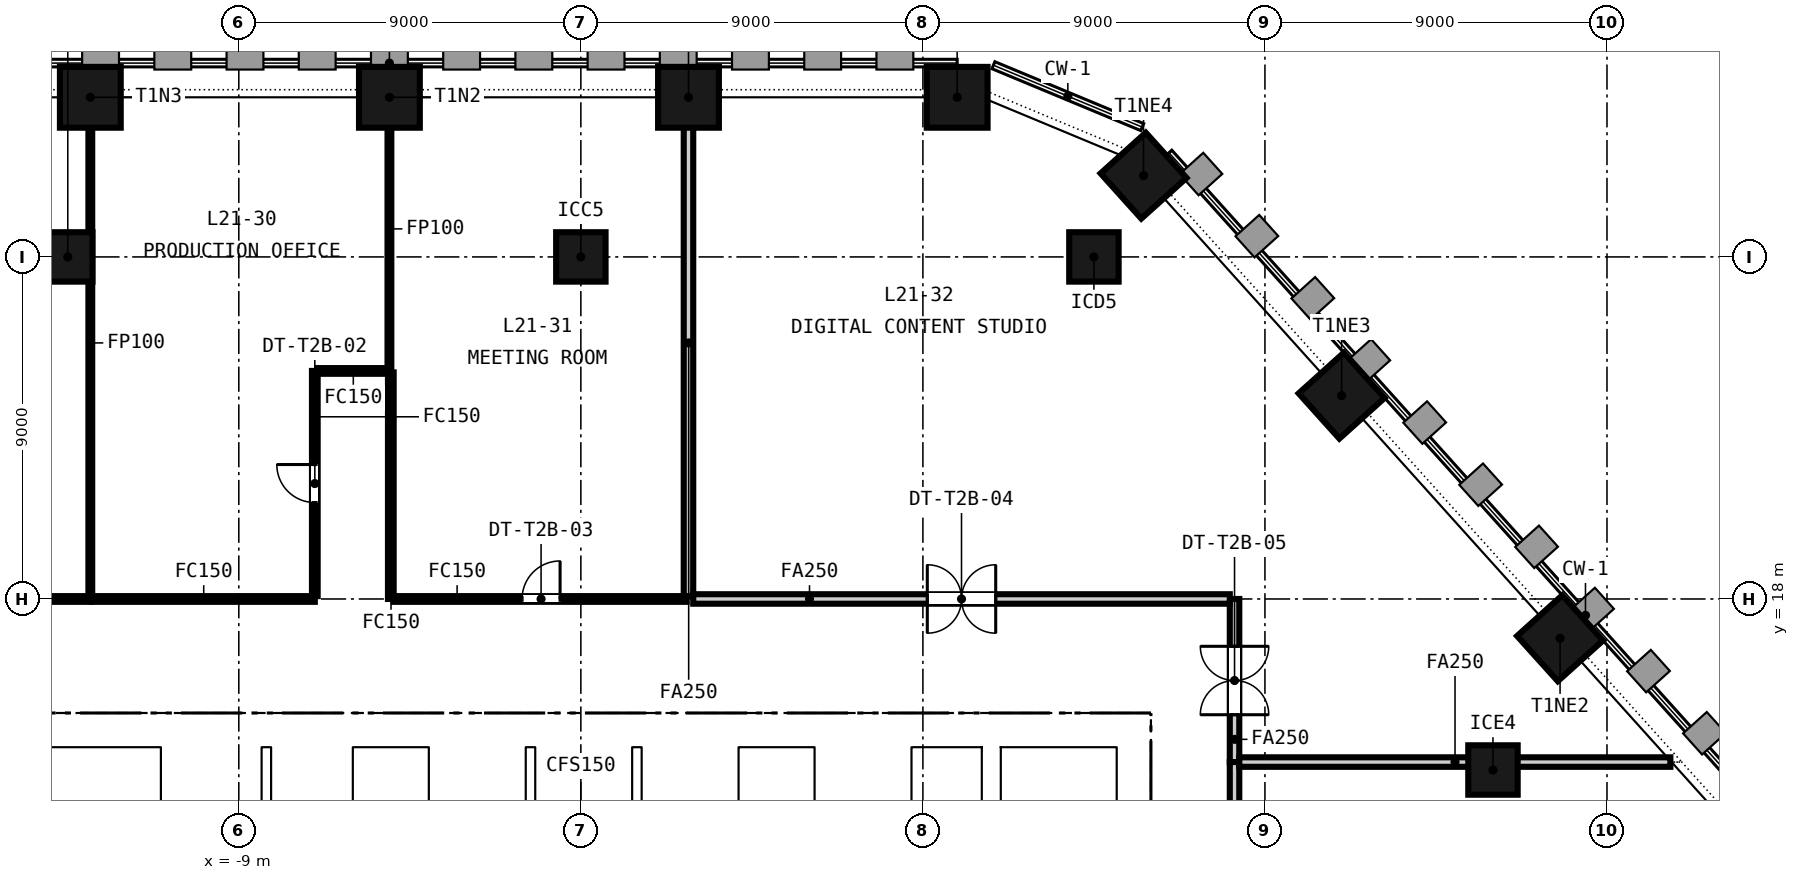
"""IFC4 building model, lengths in metres.
Left out: names, types, materials, properties, quantities, classifications, styles, units other than length and angle.
Written with IfcOpenShell. Run it as: python <this file> out.ifc"""

import sys

from ifc_helpers import new_model, si_unit, direction, frame, frame_2d, origin, origin_2d, place, context, subcontext, project, spatial, rectangle, extrude, element, fill, save


model = new_model("IFC4")
c1 = context("Model", 3, precision=1e-05, world=origin(), true_north=direction((0.0, 1.0)))
c2 = subcontext(c1, "Body", "Model", "MODEL_VIEW")
j1 = project(units=[si_unit("LENGTHUNIT", "METRE"), si_unit("PLANEANGLEUNIT", "RADIAN")], contexts=[c1])
p1 = place(None, origin())
s1 = spatial("IfcSite", under=j1, at=p1, CompositionType="ELEMENT")
p2 = place(p1, origin())
s2 = spatial("IfcBuilding", under=s1, at=p2, CompositionType="ELEMENT")
p3 = place(p2, frame((0.0, 0.0, 91.6)))
s3 = spatial("IfcBuildingStorey", under=s2, at=p3, CompositionType="ELEMENT", Elevation=91.6)
p4 = place(p3, frame((-15.0, 14.55, -0.15), z_axis=(0.0, 0.0, 1.0), x_axis=(1.0, 0.0, 0.0)))
e1 = element("IfcWall", 1, at=p4, inside=s3, PredefinedType="SOLIDWALL", context=c2, shape_type="SweptSolid", body=[
    extrude(rectangle(XDim=30.0, YDim=0.9, at=frame_2d((15.0, 0.0))), origin(), (0.0, 0.0, 1.0), 3.65),
])
p5 = place(p4, frame((9.25, 0.0, 0.15)))
e2 = element("IfcOpeningElement", 2, at=p5, cuts=e1, PredefinedType="OPENING", context=c2, shape_type="SweptSolid", body=[
    extrude(rectangle(XDim=1.5, YDim=2.1, at=frame_2d((0.75, 1.05))), frame((0.0, 0.46, 0.0), z_axis=(0.0, -1.0, 0.0), x_axis=(1.0, 0.0, 0.0)), (0.0, 0.0, 1.0), 0.92),
])
p6 = place(p4, frame((19.4, 0.0, 0.15)))
e3 = element("IfcOpeningElement", 3, at=p6, cuts=e1, PredefinedType="OPENING", context=c2, shape_type="SweptSolid", body=[
    extrude(rectangle(XDim=1.5, YDim=2.1, at=frame_2d((0.75, 1.05))), frame((0.0, 0.46, 0.0), z_axis=(0.0, -1.0, 0.0), x_axis=(1.0, 0.0, 0.0)), (0.0, 0.0, 1.0), 0.92),
])
p7 = place(p4, frame((1.5, 0.0, 0.15)))
e4 = element("IfcOpeningElement", 4, at=p7, cuts=e1, PredefinedType="OPENING", context=c2, shape_type="SweptSolid", body=[
    extrude(rectangle(XDim=1.2, YDim=2.1, at=frame_2d((0.6, 1.05))), frame((0.0, 0.46, 0.0), z_axis=(0.0, -1.0, 0.0), x_axis=(1.0, 0.0, 0.0)), (0.0, 0.0, 1.0), 0.92),
])
p8 = place(p4, frame((27.3, 0.0, 0.15)))
e5 = element("IfcOpeningElement", 5, at=p8, cuts=e1, PredefinedType="OPENING", context=c2, shape_type="SweptSolid", body=[
    extrude(rectangle(XDim=1.2, YDim=2.1, at=frame_2d((0.6, 1.05))), frame((0.0, 0.46, 0.0), z_axis=(0.0, -1.0, 0.0), x_axis=(1.0, 0.0, 0.0)), (0.0, 0.0, 1.0), 0.92),
])
p9 = place(p3, frame((14.55, 0.9, -0.15), z_axis=(0.0, 0.0, 1.0), x_axis=(0.0, 1.0, 0.0)))
e6 = element("IfcWall", 6, at=p9, inside=s3, PredefinedType="SOLIDWALL", context=c2, shape_type="SweptSolid", body=[
    extrude(rectangle(XDim=13.2, YDim=0.9, at=frame_2d((6.6, 0.0))), origin(), (0.0, 0.0, 1.0), 3.65),
])
for number, where, z_axis, x_axis in (
    (7, (-10.8, 0.9, -0.15), (0.0, 0.0, 1.0), (0.0, 1.0, 0.0)),
    (8, (10.8, 0.9, -0.15), (0.0, 0.0, 1.0), (0.0, 1.0, 0.0)),
):
    element("IfcWall", number, at=place(p3, frame(where, z_axis=z_axis, x_axis=x_axis)), inside=s3, PredefinedType="SOLIDWALL", context=c2, shape_type="SweptSolid", body=[
        extrude(rectangle(XDim=13.2, YDim=0.5, at=frame_2d((6.6, 0.0))), origin(), (0.0, 0.0, 1.0), 3.65),
    ])
for number, where, z_axis, x_axis in (
    (9, (9.902, 31.2, -0.15), (0.0, 0.0, 1.0), (-1.0, 0.0, 0.0)),
    (10, (2.832, 31.2, -0.15), (0.0, 0.0, 1.0), (-1.0, 0.0, 0.0)),
    (11, (-5.037, 31.2, -0.15), (0.0, 0.0, 1.0), (-1.0, 0.0, 0.0)),
    (12, (-12.907, 31.2, -0.15), (0.0, 0.0, 1.0), (-1.0, 0.0, 0.0)),
    (13, (25.765, 16.967, -0.15), (0.0, 0.0, 1.0), (-0.669, 0.743, 0.0)),
    (14, (20.018, 23.35, -0.15), (0.0, 0.0, 1.0), (-0.669, 0.743, 0.0)),
    (15, (14.806, 29.139, -0.15), (0.0, 0.0, 1.0), (-0.669, 0.743, 0.0)),
):
    element("IfcColumn", number, at=place(p3, frame(where, z_axis=z_axis, x_axis=x_axis)), inside=s3, PredefinedType="COLUMN", context=c2, shape_type="SweptSolid", body=[
        extrude(rectangle(XDim=1.6, YDim=1.6, at=origin_2d()), origin(), (0.0, 0.0, 1.0), 3.65),
    ])
for number, where, z_axis, x_axis in (
    (16, (-13.5, 27.0, -0.15), (0.0, 0.0, 1.0), (1.0, 0.0, 0.0)),
    (17, (0.0, 27.0, -0.15), (0.0, 0.0, 1.0), (1.0, 0.0, 0.0)),
    (18, (13.5, 27.0, -0.15), (0.0, 0.0, 1.0), (1.0, 0.0, 0.0)),
    (19, (24.0, 13.5, -0.15), (0.0, 0.0, 1.0), (1.0, 0.0, 0.0)),
):
    element("IfcColumn", number, at=place(p3, frame(where, z_axis=z_axis, x_axis=x_axis)), inside=s3, PredefinedType="COLUMN", context=c2, shape_type="SweptSolid", body=[
        extrude(rectangle(XDim=1.3, YDim=1.3, at=origin_2d()), origin(), (0.0, 0.0, 1.0), 3.65),
    ])
for number, where, z_axis, x_axis in (
    (20, (-8.275, 11.3, 0.0), (0.0, 0.0, 1.0), (0.0, 1.0, 0.0)),
    (21, (-5.875, 11.3, 0.0), (0.0, 0.0, 1.0), (0.0, 1.0, 0.0)),
    (22, (-4.125, 11.3, 0.0), (0.0, 0.0, 1.0), (0.0, 1.0, 0.0)),
    (23, (-1.325, 11.3, 0.0), (0.0, 0.0, 1.0), (0.0, 1.0, 0.0)),
    (24, (1.475, 11.3, 0.0), (0.0, 0.0, 1.0), (0.0, 1.0, 0.0)),
    (25, (4.275, 11.3, 0.0), (0.0, 0.0, 1.0), (0.0, 1.0, 0.0)),
    (26, (6.025, 11.3, 0.0), (0.0, 0.0, 1.0), (0.0, 1.0, 0.0)),
    (27, (8.825, 11.3, 0.0), (0.0, 0.0, 1.0), (0.0, 1.0, 0.0)),
):
    element("IfcWall", number, at=place(p3, frame(where, z_axis=z_axis, x_axis=x_axis)), inside=s3, PredefinedType="PARTITIONING", context=c2, shape_type="SweptSolid", body=[
        extrude(rectangle(XDim=2.8, YDim=0.25, at=frame_2d((1.4, 0.0))), origin(), (0.0, 0.0, 1.0), 3.5),
    ])
p10 = place(p3, frame((14.05, 0.9, 0.0), z_axis=(0.0, 0.0, 1.0), x_axis=(0.0, 1.0, 0.0)))
e28 = element("IfcWall", 28, at=p10, inside=s3, PredefinedType="SOLIDWALL", context=c2, shape_type="SweptSolid", body=[
    extrude(rectangle(XDim=13.2, YDim=0.1, at=frame_2d((6.6, 0.0))), origin(), (0.0, 0.0, 1.0), 3.5),
])
p11 = place(p3, frame((-5.0, 23.962, 0.0), z_axis=(0.0, 0.0, 1.0), x_axis=(0.0, -1.0, 0.0)))
e29 = element("IfcWall", 29, at=p11, inside=s3, PredefinedType="PARTITIONING", context=c2, shape_type="SweptSolid", body=[
    extrude(rectangle(XDim=5.962, YDim=0.15, at=frame_2d((2.981, 0.0))), origin(), (0.0, 0.0, 1.0), 2.741),
])
p12 = place(p3, frame((17.2, 18.0, 0.0), z_axis=(0.0, 0.0, 1.0), x_axis=(0.0, -1.0, 0.0)))
e30 = element("IfcWall", 30, at=p12, inside=s3, PredefinedType="PARTITIONING", context=c2, shape_type="SweptSolid", body=[
    extrude(rectangle(XDim=4.291, YDim=0.25, at=frame_2d((2.146, 0.0))), origin(), (0.0, 0.0, 1.0), 2.741),
])
p13 = place(p12, frame((1.246, 0.0, 0.0)))
e31 = element("IfcOpeningElement", 31, at=p13, cuts=e30, PredefinedType="OPENING", context=c2, shape_type="SweptSolid", body=[
    extrude(rectangle(XDim=1.8, YDim=2.1, at=frame_2d((0.9, 1.05))), frame((0.0, 0.135, 0.0), z_axis=(0.0, -1.0, 0.0), x_axis=(1.0, 0.0, 0.0)), (0.0, 0.0, 1.0), 0.27),
])
p14 = place(p3, frame((17.2, 13.709, 0.0), z_axis=(0.0, 0.0, 1.0), x_axis=(0.0, -1.0, 0.0)))
e32 = element("IfcWall", 32, at=p14, inside=s3, PredefinedType="PARTITIONING", context=c2, shape_type="SweptSolid", body=[
    extrude(rectangle(XDim=16.897, YDim=0.25, at=frame_2d((8.448, 0.0))), origin(), (0.0, 0.0, 1.0), 2.741),
])
p15 = place(p14, frame((7.549, 0.0, 0.0)))
e33 = element("IfcOpeningElement", 33, at=p15, cuts=e32, PredefinedType="OPENING", context=c2, shape_type="SweptSolid", body=[
    extrude(rectangle(XDim=1.8, YDim=2.1, at=frame_2d((0.9, 1.05))), frame((0.0, 0.135, 0.0), z_axis=(0.0, -1.0, 0.0), x_axis=(1.0, 0.0, 0.0)), (0.0, 0.0, 1.0), 0.27),
])
p16 = place(p3, frame((-23.786, 18.0, 0.0), z_axis=(0.0, 0.0, 1.0), x_axis=(1.0, 0.0, 0.0)))
e34 = element("IfcWall", 34, at=p16, inside=s3, PredefinedType="PARTITIONING", context=c2, shape_type="SweptSolid", body=[
    extrude(rectangle(XDim=10.879, YDim=0.15, at=frame_2d((5.439, 0.0))), origin(), (0.0, 0.0, 1.0), 2.741),
])
p17 = place(p16, frame((4.54, 0.0, 0.0)))
e35 = element("IfcOpeningElement", 35, at=p17, cuts=e34, PredefinedType="OPENING", context=c2, shape_type="SweptSolid", body=[
    extrude(rectangle(XDim=1.8, YDim=2.1, at=frame_2d((0.9, 1.05))), frame((0.0, 0.085, 0.0), z_axis=(0.0, -1.0, 0.0), x_axis=(1.0, 0.0, 0.0)), (0.0, 0.0, 1.0), 0.17),
])
p18 = place(p3, frame((-12.907, 18.075, 0.0), z_axis=(0.0, 0.0, 1.0), x_axis=(0.0, 1.0, 0.0)))
e36 = element("IfcWall", 36, at=p18, inside=s3, PredefinedType="PARTITIONING", context=c2, shape_type="SweptSolid", body=[
    extrude(rectangle(XDim=13.325, YDim=0.1, at=frame_2d((6.663, 0.0))), origin(), (0.0, 0.0, 1.0), 2.741),
])
p19 = place(p3, frame((-12.857, 18.0, 0.0), z_axis=(0.0, 0.0, 1.0), x_axis=(1.0, 0.0, 0.0)))
e37 = element("IfcWall", 37, at=p19, inside=s3, PredefinedType="PARTITIONING", context=c2, shape_type="SweptSolid", body=[
    extrude(rectangle(XDim=5.857, YDim=0.15, at=frame_2d((2.928, 0.0))), origin(), (0.0, 0.0, 1.0), 2.741),
])
p20 = place(p3, frame((-7.0, 18.075, 0.0), z_axis=(0.0, 0.0, 1.0), x_axis=(0.0, 1.0, 0.0)))
e38 = element("IfcWall", 38, at=p20, inside=s3, PredefinedType="PARTITIONING", context=c2, shape_type="SweptSolid", body=[
    extrude(rectangle(XDim=5.925, YDim=0.15, at=frame_2d((2.962, 0.0))), origin(), (0.0, 0.0, 1.0), 2.741),
])
p21 = place(p20, frame((2.462, 0.0, 0.0)))
e39 = element("IfcOpeningElement", 39, at=p21, cuts=e38, PredefinedType="OPENING", context=c2, shape_type="SweptSolid", body=[
    extrude(rectangle(XDim=1.0, YDim=2.1, at=frame_2d((0.5, 1.05))), frame((0.0, 0.085, 0.0), z_axis=(0.0, -1.0, 0.0), x_axis=(1.0, 0.0, 0.0)), (0.0, 0.0, 1.0), 0.17),
])
p22 = place(p3, frame((-6.925, 24.0, 0.0), z_axis=(0.0, 0.0, 1.0), x_axis=(1.0, 0.0, 0.0)))
e40 = element("IfcWall", 40, at=p22, inside=s3, PredefinedType="PARTITIONING", context=c2, shape_type="SweptSolid", body=[
    extrude(rectangle(XDim=1.866, YDim=0.15, at=frame_2d((0.933, 0.0))), origin(), (0.0, 0.0, 1.0), 2.741),
])
p23 = place(p3, frame((-5.037, 24.075, 0.0), z_axis=(0.0, 0.0, 1.0), x_axis=(0.0, 1.0, 0.0)))
e41 = element("IfcWall", 41, at=p23, inside=s3, PredefinedType="PARTITIONING", context=c2, shape_type="SweptSolid", body=[
    extrude(rectangle(XDim=7.325, YDim=0.1, at=frame_2d((3.663, 0.0))), origin(), (0.0, 0.0, 1.0), 2.741),
])
p24 = place(p3, frame((-4.925, 18.0, 0.0), z_axis=(0.0, 0.0, 1.0), x_axis=(1.0, 0.0, 0.0)))
e42 = element("IfcWall", 42, at=p24, inside=s3, PredefinedType="PARTITIONING", context=c2, shape_type="SweptSolid", body=[
    extrude(rectangle(XDim=7.707, YDim=0.15, at=frame_2d((3.854, 0.0))), origin(), (0.0, 0.0, 1.0), 2.741),
])
p25 = place(p24, frame((3.378, 0.0, 0.0)))
e43 = element("IfcOpeningElement", 43, at=p25, cuts=e42, PredefinedType="OPENING", context=c2, shape_type="SweptSolid", body=[
    extrude(rectangle(XDim=1.0, YDim=2.1, at=frame_2d((0.5, 1.05))), frame((0.0, 0.085, 0.0), z_axis=(0.0, -1.0, 0.0), x_axis=(1.0, 0.0, 0.0)), (0.0, 0.0, 1.0), 0.17),
])
p26 = place(p3, frame((2.832, 18.075, 0.0), z_axis=(0.0, 0.0, 1.0), x_axis=(0.0, 1.0, 0.0)))
e44 = element("IfcWall", 44, at=p26, inside=s3, PredefinedType="PARTITIONING", context=c2, shape_type="SweptSolid", body=[
    extrude(rectangle(XDim=13.325, YDim=0.25, at=frame_2d((6.663, 0.0))), origin(), (0.0, 0.0, 1.0), 2.741),
])
p27 = place(p3, frame((2.957, 18.0, 0.0), z_axis=(0.0, 0.0, 1.0), x_axis=(1.0, 0.0, 0.0)))
e45 = element("IfcWall", 45, at=p27, inside=s3, PredefinedType="PARTITIONING", context=c2, shape_type="SweptSolid", body=[
    extrude(rectangle(XDim=14.118, YDim=0.25, at=frame_2d((7.059, 0.0))), origin(), (0.0, 0.0, 1.0), 2.741),
])
p28 = place(p27, frame((6.159, 0.0, 0.0)))
e46 = element("IfcOpeningElement", 46, at=p28, cuts=e45, PredefinedType="OPENING", context=c2, shape_type="SweptSolid", body=[
    extrude(rectangle(XDim=1.8, YDim=2.1, at=frame_2d((0.9, 1.05))), frame((0.0, 0.135, 0.0), z_axis=(0.0, -1.0, 0.0), x_axis=(1.0, 0.0, 0.0)), (0.0, 0.0, 1.0), 0.27),
])
p29 = place(p3, frame((17.325, 13.709, 0.0), z_axis=(0.0, 0.0, 1.0), x_axis=(1.0, 0.0, 0.0)))
e47 = element("IfcWall", 47, at=p29, inside=s3, PredefinedType="PARTITIONING", context=c2, shape_type="SweptSolid", body=[
    extrude(rectangle(XDim=11.343, YDim=0.25, at=frame_2d((5.671, 0.0))), origin(), (0.0, 0.0, 1.0), 2.741),
])
p30 = place(p5, origin())
e48 = element("IfcDoor", 48, at=p30, inside=s3, OperationType="DOUBLE_DOOR_SINGLE_SWING", PredefinedType="DOOR", context=c2, shape_type="SweptSolid", body=[
    extrude(rectangle(XDim=1.5, YDim=2.1, at=frame_2d((0.75, 1.05))), frame((0.0, 0.025, 0.0), z_axis=(0.0, -1.0, 0.0), x_axis=(1.0, 0.0, 0.0)), (0.0, 0.0, 1.0), 0.05),
])
fill(e2, e48)
p31 = place(p6, origin())
e49 = element("IfcDoor", 49, at=p31, inside=s3, OperationType="DOUBLE_DOOR_SINGLE_SWING", PredefinedType="DOOR", context=c2, shape_type="SweptSolid", body=[
    extrude(rectangle(XDim=1.5, YDim=2.1, at=frame_2d((0.75, 1.05))), frame((0.0, 0.025, 0.0), z_axis=(0.0, -1.0, 0.0), x_axis=(1.0, 0.0, 0.0)), (0.0, 0.0, 1.0), 0.05),
])
fill(e3, e49)
p32 = place(p7, origin())
e50 = element("IfcDoor", 50, at=p32, inside=s3, OperationType="SINGLE_SWING_RIGHT", PredefinedType="DOOR", context=c2, shape_type="SweptSolid", body=[
    extrude(rectangle(XDim=1.2, YDim=2.1, at=frame_2d((0.6, 1.05))), frame((0.0, 0.025, 0.0), z_axis=(0.0, -1.0, 0.0), x_axis=(1.0, 0.0, 0.0)), (0.0, 0.0, 1.0), 0.05),
])
fill(e4, e50)
p33 = place(p8, origin())
e51 = element("IfcDoor", 51, at=p33, inside=s3, OperationType="SINGLE_SWING_LEFT", PredefinedType="DOOR", context=c2, shape_type="SweptSolid", body=[
    extrude(rectangle(XDim=1.2, YDim=2.1, at=frame_2d((0.6, 1.05))), frame((0.0, 0.025, 0.0), z_axis=(0.0, -1.0, 0.0), x_axis=(1.0, 0.0, 0.0)), (0.0, 0.0, 1.0), 0.05),
])
fill(e5, e51)
p34 = place(p21, origin())
e52 = element("IfcDoor", 52, at=p34, inside=s3, OperationType="SINGLE_SWING_RIGHT", PredefinedType="DOOR", context=c2, shape_type="SweptSolid", body=[
    extrude(rectangle(XDim=1.0, YDim=2.1, at=frame_2d((0.5, 1.05))), frame((0.0, 0.025, 0.0), z_axis=(0.0, -1.0, 0.0), x_axis=(1.0, 0.0, 0.0)), (0.0, 0.0, 1.0), 0.05),
])
fill(e39, e52)
p35 = place(p25, origin())
e53 = element("IfcDoor", 53, at=p35, inside=s3, OperationType="SINGLE_SWING_RIGHT", PredefinedType="DOOR", context=c2, shape_type="SweptSolid", body=[
    extrude(rectangle(XDim=1.0, YDim=2.1, at=frame_2d((0.5, 1.05))), frame((0.0, 0.025, 0.0), z_axis=(0.0, -1.0, 0.0), x_axis=(1.0, 0.0, 0.0)), (0.0, 0.0, 1.0), 0.05),
])
fill(e43, e53)
p36 = place(p28, origin())
e54 = element("IfcDoor", 54, at=p36, inside=s3, OperationType="DOUBLE_DOOR_DOUBLE_SWING", PredefinedType="DOOR", context=c2, shape_type="SweptSolid", body=[
    extrude(rectangle(XDim=1.8, YDim=2.1, at=frame_2d((0.9, 1.05))), frame((0.0, 0.025, 0.0), z_axis=(0.0, -1.0, 0.0), x_axis=(1.0, 0.0, 0.0)), (0.0, 0.0, 1.0), 0.05),
])
fill(e46, e54)
p37 = place(p13, origin())
e55 = element("IfcDoor", 55, at=p37, inside=s3, OperationType="DOUBLE_DOOR_DOUBLE_SWING", PredefinedType="DOOR", context=c2, shape_type="SweptSolid", body=[
    extrude(rectangle(XDim=1.8, YDim=2.1, at=frame_2d((0.9, 1.05))), frame((0.0, 0.025, 0.0), z_axis=(0.0, -1.0, 0.0), x_axis=(1.0, 0.0, 0.0)), (0.0, 0.0, 1.0), 0.05),
])
fill(e31, e55)
save(model, sys.argv[1])
